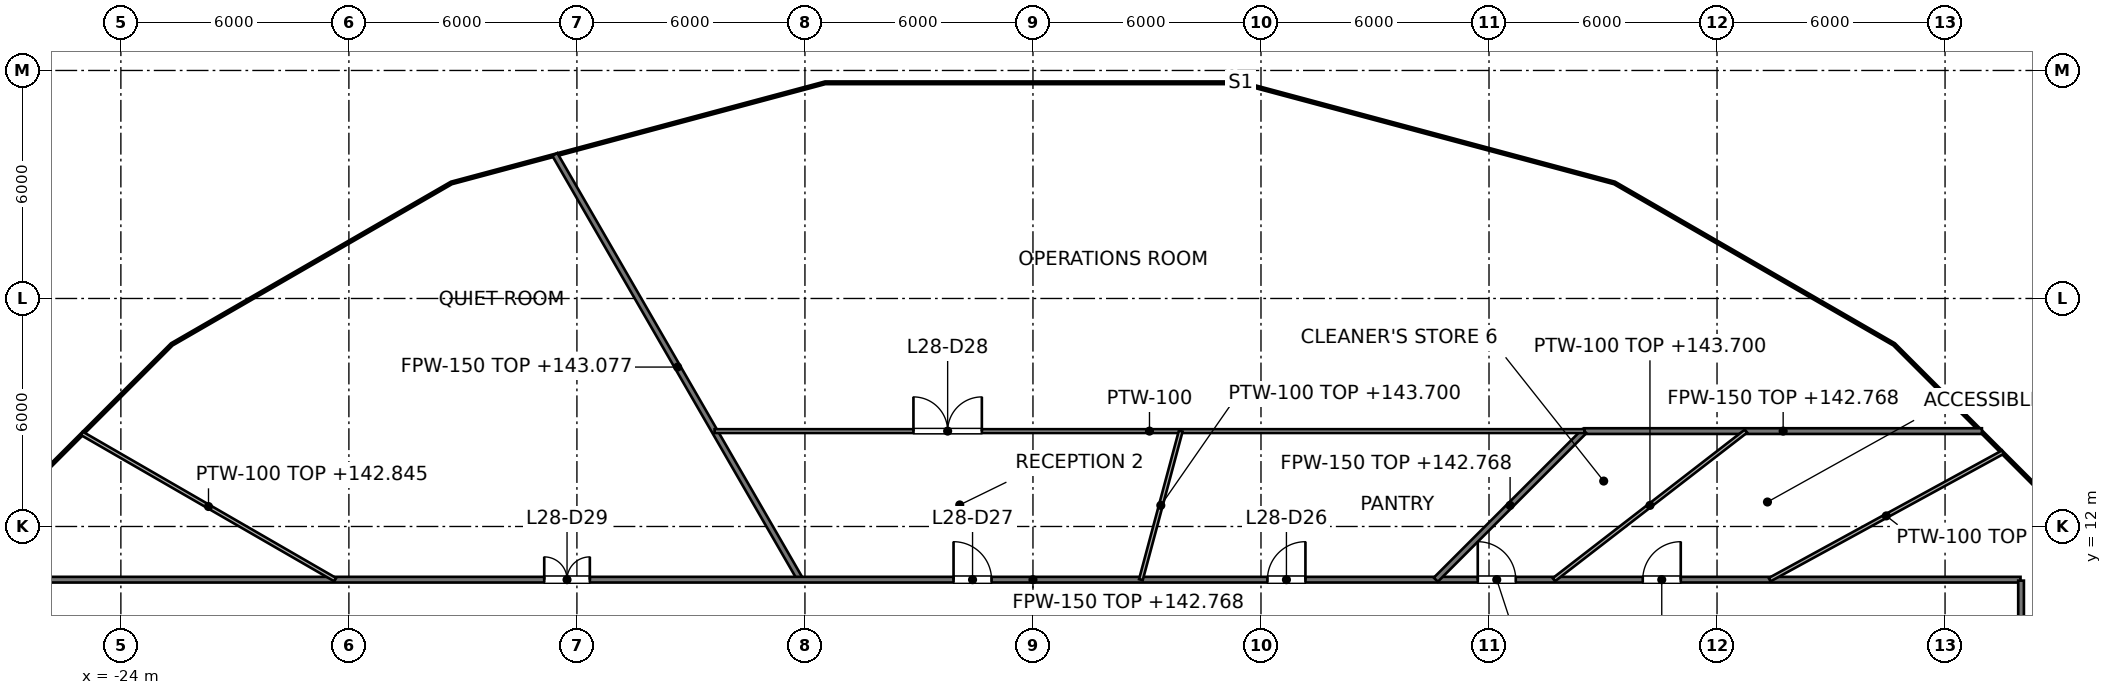
"""IFC4 building model, lengths in metres.
Left out: names, types, materials, properties, quantities, classifications, styles, units other than length and angle.
Written with IfcOpenShell. Run it as: python <this file> out.ifc"""

import sys

from ifc_helpers import new_model, si_unit, direction, frame, frame_2d, origin, place, context, subcontext, project, spatial, rectangle, extrude, element, fill, save


model = new_model("IFC4")
c1 = context("Model", 3, precision=1e-05, world=origin(), true_north=direction((0.0, 1.0)))
c2 = subcontext(c1, "Body", "Model", "MODEL_VIEW")
j1 = project(units=[si_unit("LENGTHUNIT", "METRE"), si_unit("PLANEANGLEUNIT", "RADIAN")], contexts=[c1])
p1 = place(None, origin())
s1 = spatial("IfcSite", under=j1, at=p1, CompositionType="ELEMENT")
p2 = place(p1, origin())
s2 = spatial("IfcBuilding", under=s1, at=p2, CompositionType="ELEMENT")
p3 = place(p2, frame((0.0, 0.0, 139.8)))
s3 = spatial("IfcBuildingStorey", under=s2, at=p3, CompositionType="ELEMENT", Elevation=139.8)
p4 = place(p3, frame((-12.581, 21.79, 0.0), z_axis=(0.0, 0.0, 1.0), x_axis=(0.500038653944, -0.866003085769, 0.0)))
e1 = element("IfcWall", 1, at=p4, inside=s3, PredefinedType="PARTITIONING", context=c2, shape_type="SweptSolid", body=[
    extrude(rectangle(XDim=12.921, YDim=0.15, at=frame_2d((6.461, 0.0))), origin(), (0.0, 0.0, 1.0), 3.277),
])
p5 = place(p3, frame((-25.986, 10.6, 0.0), z_axis=(0.0, 0.0, 1.0), x_axis=(1.0, 0.0, 0.0)))
e2 = element("IfcWall", 2, at=p5, inside=s3, PredefinedType="PARTITIONING", context=c2, shape_type="SweptSolid", body=[
    extrude(rectangle(XDim=51.972, YDim=0.15, at=frame_2d((25.986, 0.0))), origin(), (0.0, 0.0, 1.0), 2.968),
])
p6 = place(p5, frame((42.031, 0.0, 0.0)))
e3 = element("IfcOpeningElement", 3, at=p6, cuts=e2, PredefinedType="OPENING", context=c2, shape_type="SweptSolid", body=[
    extrude(rectangle(XDim=1.0, YDim=2.1, at=frame_2d((0.5, 1.05))), frame((0.0, 0.075, 0.0), z_axis=(0.0, -1.0, 0.0), x_axis=(1.0, 0.0, 0.0)), (0.0, 0.0, 1.0), 0.15),
])
p7 = place(p5, frame((37.69, 0.0, 0.0)))
e4 = element("IfcOpeningElement", 4, at=p7, cuts=e2, PredefinedType="OPENING", context=c2, shape_type="SweptSolid", body=[
    extrude(rectangle(XDim=1.0, YDim=2.1, at=frame_2d((0.5, 1.05))), frame((0.0, 0.075, 0.0), z_axis=(0.0, -1.0, 0.0), x_axis=(1.0, 0.0, 0.0)), (0.0, 0.0, 1.0), 0.15),
])
p8 = place(p5, frame((32.156, 0.0, 0.0)))
e5 = element("IfcOpeningElement", 5, at=p8, cuts=e2, PredefinedType="OPENING", context=c2, shape_type="SweptSolid", body=[
    extrude(rectangle(XDim=1.0, YDim=2.1, at=frame_2d((0.5, 1.05))), frame((0.0, 0.075, 0.0), z_axis=(0.0, -1.0, 0.0), x_axis=(1.0, 0.0, 0.0)), (0.0, 0.0, 1.0), 0.15),
])
p9 = place(p5, frame((23.896, 0.0, 0.0)))
e6 = element("IfcOpeningElement", 6, at=p9, cuts=e2, PredefinedType="OPENING", context=c2, shape_type="SweptSolid", body=[
    extrude(rectangle(XDim=1.0, YDim=2.1, at=frame_2d((0.5, 1.05))), frame((0.0, 0.075, 0.0), z_axis=(0.0, -1.0, 0.0), x_axis=(1.0, 0.0, 0.0)), (0.0, 0.0, 1.0), 0.15),
])
p10 = place(p5, frame((13.126, 0.0, 0.0)))
e7 = element("IfcOpeningElement", 7, at=p10, cuts=e2, PredefinedType="OPENING", context=c2, shape_type="SweptSolid", body=[
    extrude(rectangle(XDim=1.2, YDim=2.1, at=frame_2d((0.6, 1.05))), frame((0.0, 0.075, 0.0), z_axis=(0.0, -1.0, 0.0), x_axis=(1.0, 0.0, 0.0)), (0.0, 0.0, 1.0), 0.15),
])
p11 = place(p3, frame((14.51, 14.51, 0.0), z_axis=(0.0, 0.0, 1.0), x_axis=(1.0, 0.0, 0.0)))
e8 = element("IfcWall", 8, at=p11, inside=s3, PredefinedType="PARTITIONING", context=c2, shape_type="SweptSolid", body=[
    extrude(rectangle(XDim=10.46, YDim=0.15, at=frame_2d((5.23, 0.0))), origin(), (0.0, 0.0, 1.0), 2.968),
])
p12 = place(p3, frame((10.6, 10.6, 0.0), z_axis=(0.0, 0.0, 1.0), x_axis=(0.707106781187, 0.707106781187, 0.0)))
e9 = element("IfcWall", 9, at=p12, inside=s3, PredefinedType="PARTITIONING", context=c2, shape_type="SweptSolid", body=[
    extrude(rectangle(XDim=5.53, YDim=0.15, at=frame_2d((2.765, 0.0))), origin(), (0.0, 0.0, 1.0), 2.968),
])
p13 = place(p3, frame((26.0, 7.8, 0.0), z_axis=(0.0, 0.0, 1.0), x_axis=(0.0, 1.0, 0.0)))
e10 = element("IfcWall", 10, at=p13, inside=s3, PredefinedType="PARTITIONING", context=c2, shape_type="SweptSolid", body=[
    extrude(rectangle(XDim=2.775, YDim=0.15, at=frame_2d((1.387, 0.0))), origin(), (0.0, 0.0, 1.0), 2.977),
])
p14 = place(p3, frame((-25.029, 14.451, 0.0), z_axis=(0.0, 0.0, 1.0), x_axis=(0.865996573404, -0.500049932359, 0.0)))
e11 = element("IfcWall", 11, at=p14, inside=s3, PredefinedType="PARTITIONING", context=c2, shape_type="SweptSolid", body=[
    extrude(rectangle(XDim=7.701, YDim=0.1, at=frame_2d((3.851, 0.0))), origin(), (0.0, 0.0, 1.0), 3.045),
])
p15 = place(p3, frame((-8.378, 14.51, 0.0), z_axis=(0.0, 0.0, 1.0), x_axis=(1.0, 0.0, 0.0)))
e12 = element("IfcWall", 12, at=p15, inside=s3, PredefinedType="PARTITIONING", context=c2, shape_type="SweptSolid", body=[
    extrude(rectangle(XDim=22.888, YDim=0.1, at=frame_2d((11.444, 0.0))), origin(), (0.0, 0.0, 1.0), 2.968),
])
p16 = place(p15, frame((5.233, 0.0, 0.0)))
e13 = element("IfcOpeningElement", 13, at=p16, cuts=e12, PredefinedType="OPENING", context=c2, shape_type="SweptSolid", body=[
    extrude(rectangle(XDim=1.8, YDim=2.1, at=frame_2d((0.9, 1.05))), frame((0.0, 0.05, 0.0), z_axis=(0.0, -1.0, 0.0), x_axis=(1.0, 0.0, 0.0)), (0.0, 0.0, 1.0), 0.1),
])
p17 = place(p3, frame((19.384, 10.6, 0.0), z_axis=(0.0, 0.0, 1.0), x_axis=(0.877388352769, 0.479780865006, 0.0)))
e14 = element("IfcWall", 14, at=p17, inside=s3, PredefinedType="PARTITIONING", context=c2, shape_type="SweptSolid", body=[
    extrude(rectangle(XDim=6.997, YDim=0.1, at=frame_2d((3.499, 0.0))), origin(), (0.0, 0.0, 1.0), 3.474),
])
p18 = place(p3, frame((13.707, 10.6, 0.0), z_axis=(0.0, 0.0, 1.0), x_axis=(0.791052244704, 0.611748597177, 0.0)))
e15 = element("IfcWall", 15, at=p18, inside=s3, PredefinedType="PARTITIONING", context=c2, shape_type="SweptSolid", body=[
    extrude(rectangle(XDim=6.391, YDim=0.1, at=frame_2d((3.196, 0.0))), origin(), (0.0, 0.0, 1.0), 3.9),
])
p19 = place(p3, frame((2.84, 10.6, 0.0), z_axis=(0.0, 0.0, 1.0), x_axis=(0.258863707653, 0.965913857888, 0.0)))
e16 = element("IfcWall", 16, at=p19, inside=s3, PredefinedType="PARTITIONING", context=c2, shape_type="SweptSolid", body=[
    extrude(rectangle(XDim=4.048, YDim=0.1, at=frame_2d((2.024, 0.0))), origin(), (0.0, 0.0, 1.0), 3.9),
])
p20 = place(p6, origin())
e17 = element("IfcDoor", 17, at=p20, inside=s3, OperationType="SINGLE_SWING_RIGHT", PredefinedType="DOOR", context=c2, shape_type="SweptSolid", body=[
    extrude(rectangle(XDim=1.0, YDim=2.1, at=frame_2d((0.5, 1.05))), frame((0.0, 0.025, 0.0), z_axis=(0.0, -1.0, 0.0), x_axis=(1.0, 0.0, 0.0)), (0.0, 0.0, 1.0), 0.05),
])
fill(e3, e17)
p21 = place(p7, origin())
e18 = element("IfcDoor", 18, at=p21, inside=s3, OperationType="SINGLE_SWING_LEFT", PredefinedType="DOOR", context=c2, shape_type="SweptSolid", body=[
    extrude(rectangle(XDim=1.0, YDim=2.1, at=frame_2d((0.5, 1.05))), frame((0.0, 0.025, 0.0), z_axis=(0.0, -1.0, 0.0), x_axis=(1.0, 0.0, 0.0)), (0.0, 0.0, 1.0), 0.05),
])
fill(e4, e18)
p22 = place(p8, origin())
e19 = element("IfcDoor", 19, at=p22, inside=s3, OperationType="SINGLE_SWING_RIGHT", PredefinedType="DOOR", context=c2, shape_type="SweptSolid", body=[
    extrude(rectangle(XDim=1.0, YDim=2.1, at=frame_2d((0.5, 1.05))), frame((0.0, 0.025, 0.0), z_axis=(0.0, -1.0, 0.0), x_axis=(1.0, 0.0, 0.0)), (0.0, 0.0, 1.0), 0.05),
])
fill(e5, e19)
p23 = place(p9, origin())
e20 = element("IfcDoor", 20, at=p23, inside=s3, OperationType="SINGLE_SWING_LEFT", PredefinedType="DOOR", context=c2, shape_type="SweptSolid", body=[
    extrude(rectangle(XDim=1.0, YDim=2.1, at=frame_2d((0.5, 1.05))), frame((0.0, 0.025, 0.0), z_axis=(0.0, -1.0, 0.0), x_axis=(1.0, 0.0, 0.0)), (0.0, 0.0, 1.0), 0.05),
])
fill(e6, e20)
p24 = place(p16, origin())
e21 = element("IfcDoor", 21, at=p24, inside=s3, OperationType="DOUBLE_DOOR_SINGLE_SWING", PredefinedType="DOOR", context=c2, shape_type="SweptSolid", body=[
    extrude(rectangle(XDim=1.8, YDim=2.1, at=frame_2d((0.9, 1.05))), frame((0.0, 0.025, 0.0), z_axis=(0.0, -1.0, 0.0), x_axis=(1.0, 0.0, 0.0)), (0.0, 0.0, 1.0), 0.05),
])
fill(e13, e21)
p25 = place(p10, origin())
e22 = element("IfcDoor", 22, at=p25, inside=s3, OperationType="DOUBLE_DOOR_SINGLE_SWING", PredefinedType="DOOR", context=c2, shape_type="SweptSolid", body=[
    extrude(rectangle(XDim=1.2, YDim=2.1, at=frame_2d((0.6, 1.05))), frame((0.0, 0.025, 0.0), z_axis=(0.0, -1.0, 0.0), x_axis=(1.0, 0.0, 0.0)), (0.0, 0.0, 1.0), 0.05),
])
fill(e7, e22)
save(model, sys.argv[1])
